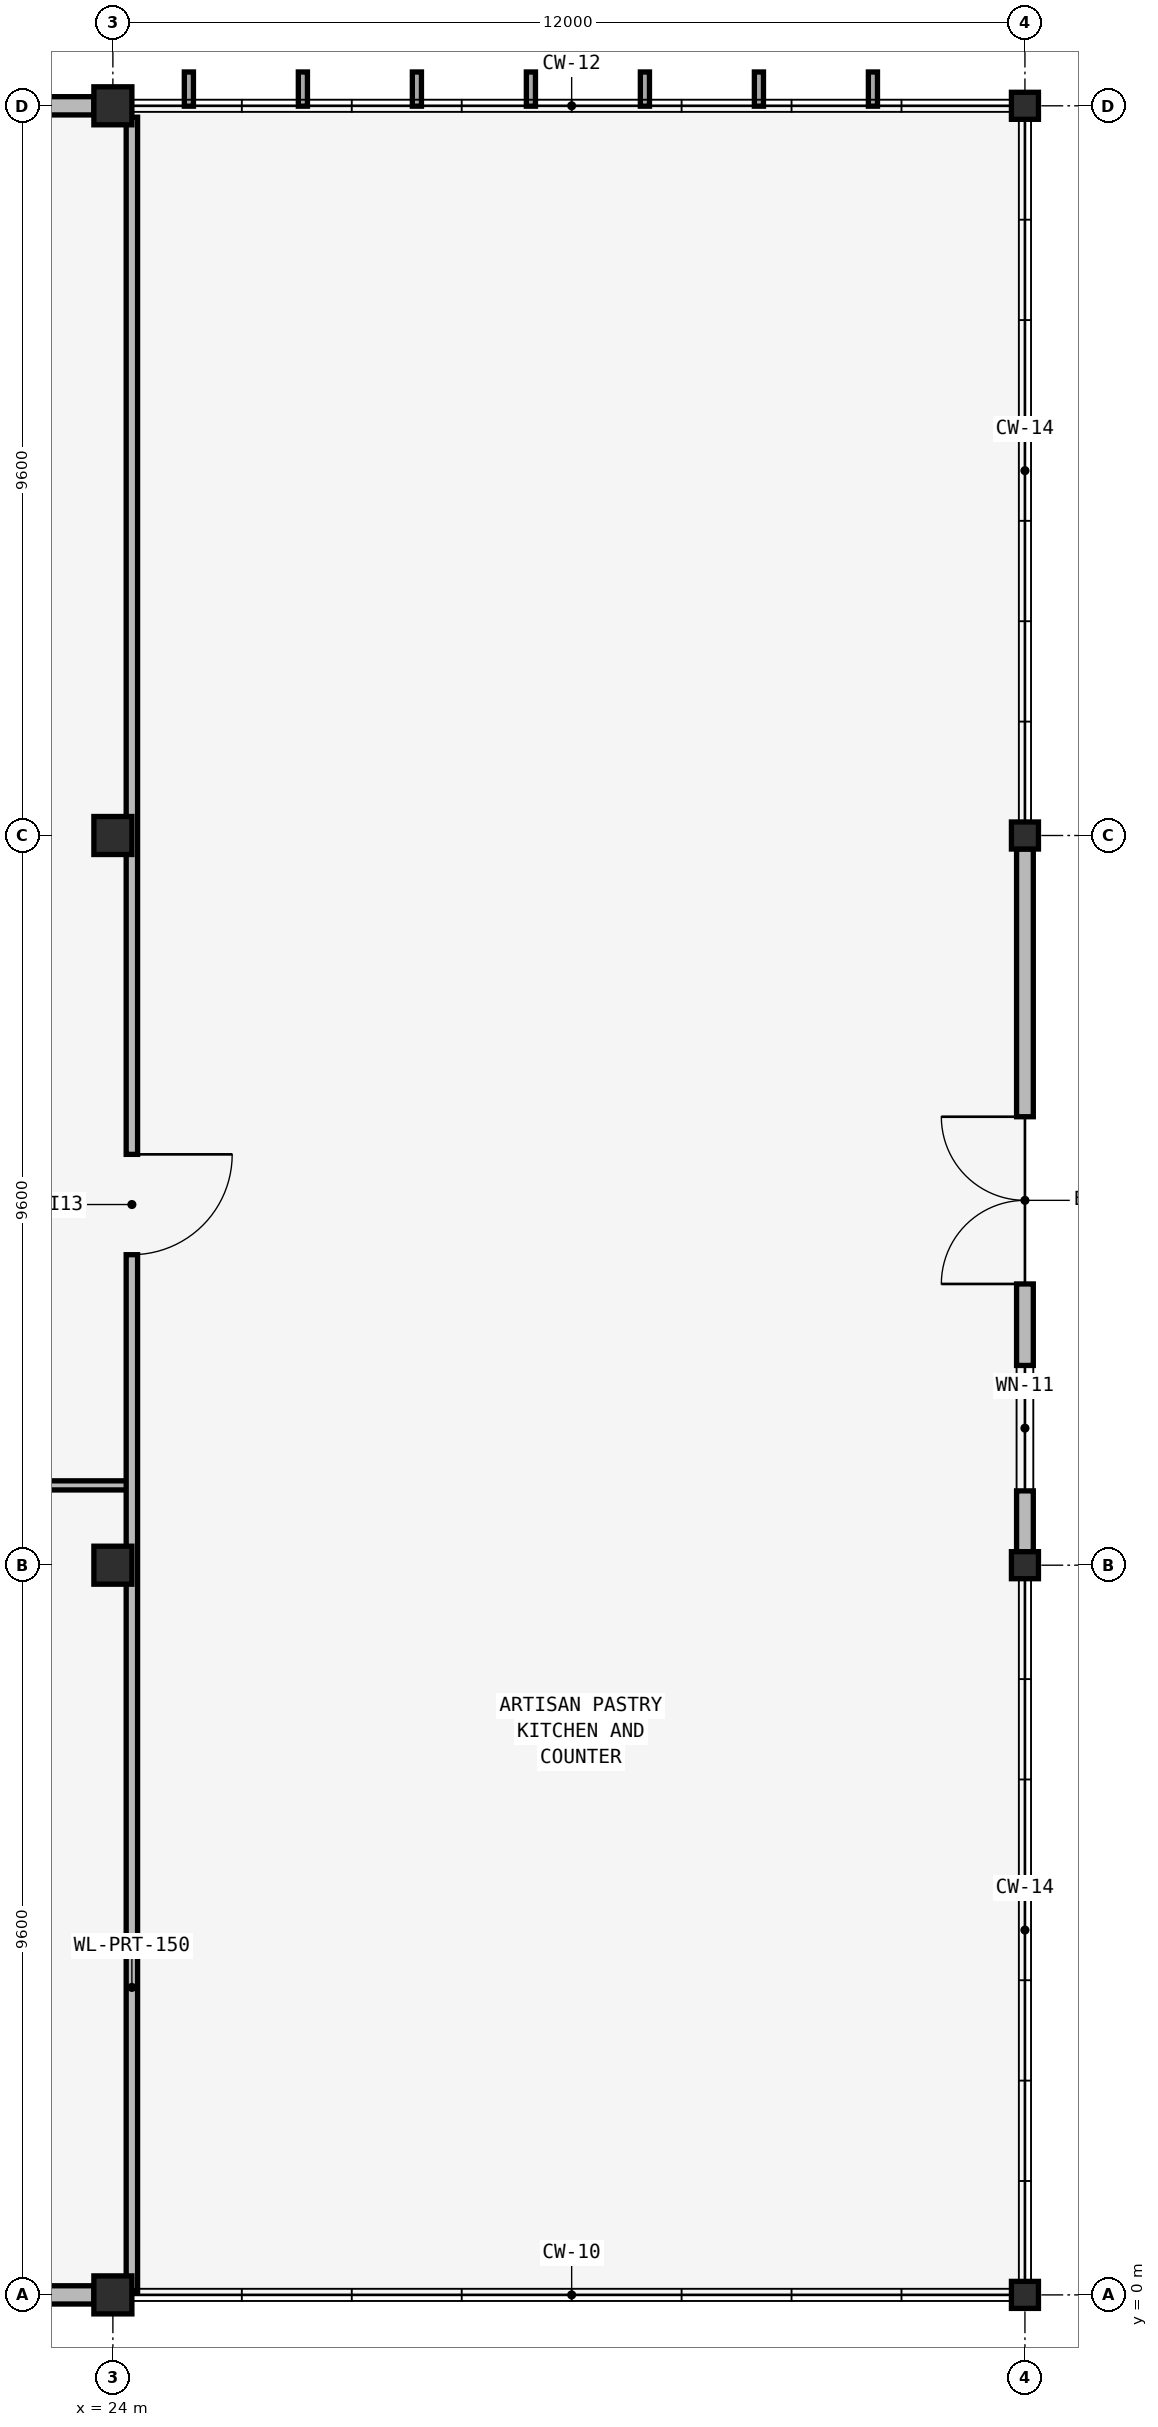
"""IFC4 building model, lengths in metres.
Left out: names, types, materials, properties, quantities, classifications, styles, units other than length and angle.
Written with IfcOpenShell. Run it as: python <this file> out.ifc"""

import sys

from ifc_helpers import new_model, si_unit, direction, frame, frame_2d, origin, origin_2d, place, context, subcontext, project, spatial, rectangle, hollow_circle, extrude, element, fill, save


model = new_model("IFC4")
c1 = context("Model", 3, precision=1e-05, world=origin(), true_north=direction((0.0, 1.0)))
c2 = subcontext(c1, "Body", "Model", "MODEL_VIEW")
j1 = project(units=[si_unit("LENGTHUNIT", "METRE"), si_unit("PLANEANGLEUNIT", "RADIAN")], contexts=[c1])
p1 = place(None, origin())
s1 = spatial("IfcSite", under=j1, at=p1, CompositionType="ELEMENT")
p2 = place(p1, origin())
s2 = spatial("IfcBuilding", under=s1, at=p2, CompositionType="ELEMENT")
p3 = place(p2, origin())
s3 = spatial("IfcBuildingStorey", under=s2, at=p3, CompositionType="ELEMENT", Elevation=0.0)
p4 = place(p3, frame((24.0, 0.0, -0.27), z_axis=(0.0, 0.0, 1.0), x_axis=(1.0, 0.0, 0.0)))
e1 = element("IfcColumn", 1, at=p4, inside=s3, PredefinedType="COLUMN", context=c2, shape_type="SweptSolid", body=[
    extrude(rectangle(XDim=0.5, YDim=0.5, at=origin_2d()), origin(), (0.0, 0.0, 1.0), 5.67),
])
p5 = place(p3, frame((36.0, 0.0, -0.27), z_axis=(0.0, 0.0, 1.0), x_axis=(1.0, 0.0, 0.0)))
e2 = element("IfcColumn", 2, at=p5, inside=s3, PredefinedType="COLUMN", context=c2, shape_type="SweptSolid", body=[
    extrude(hollow_circle(Radius=0.178, WallThickness=0.013, at=origin_2d()), origin(), (0.0, 0.0, 1.0), 5.67),
])
p6 = place(p3, frame((24.0, 9.6, -0.27), z_axis=(0.0, 0.0, 1.0), x_axis=(1.0, 0.0, 0.0)))
e3 = element("IfcColumn", 3, at=p6, inside=s3, PredefinedType="COLUMN", context=c2, shape_type="SweptSolid", body=[
    extrude(rectangle(XDim=0.5, YDim=0.5, at=origin_2d()), origin(), (0.0, 0.0, 1.0), 5.67),
])
p7 = place(p3, frame((36.0, 9.6, -0.27), z_axis=(0.0, 0.0, 1.0), x_axis=(1.0, 0.0, 0.0)))
e4 = element("IfcColumn", 4, at=p7, inside=s3, PredefinedType="COLUMN", context=c2, shape_type="SweptSolid", body=[
    extrude(hollow_circle(Radius=0.178, WallThickness=0.013, at=origin_2d()), origin(), (0.0, 0.0, 1.0), 5.67),
])
p8 = place(p3, frame((24.0, 19.2, -0.27), z_axis=(0.0, 0.0, 1.0), x_axis=(1.0, 0.0, 0.0)))
e5 = element("IfcColumn", 5, at=p8, inside=s3, PredefinedType="COLUMN", context=c2, shape_type="SweptSolid", body=[
    extrude(rectangle(XDim=0.5, YDim=0.5, at=origin_2d()), origin(), (0.0, 0.0, 1.0), 5.67),
])
p9 = place(p3, frame((36.0, 19.2, -0.27), z_axis=(0.0, 0.0, 1.0), x_axis=(1.0, 0.0, 0.0)))
e6 = element("IfcColumn", 6, at=p9, inside=s3, PredefinedType="COLUMN", context=c2, shape_type="SweptSolid", body=[
    extrude(hollow_circle(Radius=0.178, WallThickness=0.013, at=origin_2d()), origin(), (0.0, 0.0, 1.0), 5.67),
])
p10 = place(p3, frame((24.0, 28.8, -0.27), z_axis=(0.0, 0.0, 1.0), x_axis=(1.0, 0.0, 0.0)))
e7 = element("IfcColumn", 7, at=p10, inside=s3, PredefinedType="COLUMN", context=c2, shape_type="SweptSolid", body=[
    extrude(rectangle(XDim=0.5, YDim=0.5, at=origin_2d()), origin(), (0.0, 0.0, 1.0), 5.67),
])
p11 = place(p3, frame((36.0, 28.8, -0.27), z_axis=(0.0, 0.0, 1.0), x_axis=(1.0, 0.0, 0.0)))
e8 = element("IfcColumn", 8, at=p11, inside=s3, PredefinedType="COLUMN", context=c2, shape_type="SweptSolid", body=[
    extrude(hollow_circle(Radius=0.178, WallThickness=0.013, at=origin_2d()), origin(), (0.0, 0.0, 1.0), 5.67),
])
p12 = place(p3, frame((12.25, 0.0, 0.0), z_axis=(0.0, 0.0, 1.0), x_axis=(1.0, 0.0, 0.0)))
e9 = element("IfcWall", 9, at=p12, inside=s3, PredefinedType="SOLIDWALL", context=c2, shape_type="SweptSolid", body=[
    extrude(rectangle(XDim=11.5, YDim=0.24, at=frame_2d((5.75, 0.0))), origin(), (0.0, 0.0, 1.0), 4.456),
])
p13 = place(p12, frame((4.55, 0.0, 0.0)))
e10 = element("IfcOpeningElement", 10, at=p13, cuts=e9, PredefinedType="OPENING", context=c2, shape_type="SweptSolid", body=[
    extrude(rectangle(XDim=2.4, YDim=2.4, at=frame_2d((1.2, 1.2))), frame((0.0, 0.135, 0.0), z_axis=(0.0, -1.0, 0.0), x_axis=(1.0, 0.0, 0.0)), (0.0, 0.0, 1.0), 0.27),
])
p14 = place(p3, frame((12.25, 28.8, 0.0), z_axis=(0.0, 0.0, 1.0), x_axis=(1.0, 0.0, 0.0)))
e11 = element("IfcWall", 11, at=p14, inside=s3, PredefinedType="SOLIDWALL", context=c2, shape_type="SweptSolid", body=[
    extrude(rectangle(XDim=11.5, YDim=0.24, at=frame_2d((5.75, 0.0))), origin(), (0.0, 0.0, 1.0), 4.456),
])
p15 = place(p14, frame((4.75, 0.0, 0.0)))
e12 = element("IfcOpeningElement", 12, at=p15, cuts=e11, PredefinedType="OPENING", context=c2, shape_type="SweptSolid", body=[
    extrude(rectangle(XDim=2.0, YDim=2.3, at=frame_2d((1.0, 1.15))), frame((0.0, 0.135, 0.0), z_axis=(0.0, -1.0, 0.0), x_axis=(1.0, 0.0, 0.0)), (0.0, 0.0, 1.0), 0.27),
])
p16 = place(p3, frame((36.0, 9.778, 0.0), z_axis=(0.0, 0.0, 1.0), x_axis=(0.0, 1.0, 0.0)))
e13 = element("IfcWall", 13, at=p16, inside=s3, PredefinedType="SOLIDWALL", context=c2, shape_type="SweptSolid", body=[
    extrude(rectangle(XDim=9.244, YDim=0.22, at=frame_2d((4.622, 0.0))), origin(), (0.0, 0.0, 1.0), 4.456),
])
p17 = place(p16, frame((3.522, 0.0, 0.0)))
e14 = element("IfcOpeningElement", 14, at=p17, cuts=e13, PredefinedType="OPENING", context=c2, shape_type="SweptSolid", body=[
    extrude(rectangle(XDim=2.2, YDim=2.4, at=frame_2d((1.1, 1.2))), frame((0.0, 0.125, 0.0), z_axis=(0.0, -1.0, 0.0), x_axis=(1.0, 0.0, 0.0)), (0.0, 0.0, 1.0), 0.25),
])
p18 = place(p16, frame((0.8, 0.0, 0.8)))
e15 = element("IfcOpeningElement", 15, at=p18, cuts=e13, PredefinedType="OPENING", context=c2, shape_type="SweptSolid", body=[
    extrude(rectangle(XDim=1.65, YDim=2.1, at=frame_2d((0.825, 1.05))), frame((0.0, 0.125, 0.0), z_axis=(0.0, -1.0, 0.0), x_axis=(1.0, 0.0, 0.0)), (0.0, 0.0, 1.0), 0.25),
])
p19 = place(p3, frame((12.35, 10.65, 0.0), z_axis=(0.0, 0.0, 1.0), x_axis=(1.0, 0.0, 0.0)))
e16 = element("IfcWall", 16, at=p19, inside=s3, PredefinedType="PARTITIONING", context=c2, shape_type="SweptSolid", body=[
    extrude(rectangle(XDim=11.9, YDim=0.12, at=frame_2d((5.95, 0.0))), origin(), (0.0, 0.0, 1.0), 5.08),
])
p20 = place(p19, frame((5.025, 0.0, 0.0)))
e17 = element("IfcOpeningElement", 17, at=p20, cuts=e16, PredefinedType="OPENING", context=c2, shape_type="SweptSolid", body=[
    extrude(rectangle(XDim=1.85, YDim=2.2, at=frame_2d((0.925, 1.1))), frame((0.0, 0.075, 0.0), z_axis=(0.0, -1.0, 0.0), x_axis=(1.0, 0.0, 0.0)), (0.0, 0.0, 1.0), 0.15),
])
p21 = place(p3, frame((24.25, 0.04, 0.0), z_axis=(0.0, 0.0, 1.0), x_axis=(0.0, 1.0, 0.0)))
e18 = element("IfcWall", 18, at=p21, inside=s3, PredefinedType="PARTITIONING", context=c2, shape_type="SweptSolid", body=[
    extrude(rectangle(XDim=28.61, YDim=0.15, at=frame_2d((14.305, 0.0))), origin(), (0.0, 0.0, 1.0), 5.08),
])
p22 = place(p21, frame((13.645, 0.0, 0.0)))
e19 = element("IfcOpeningElement", 19, at=p22, cuts=e18, PredefinedType="OPENING", context=c2, shape_type="SweptSolid", body=[
    extrude(rectangle(XDim=1.32, YDim=2.15, at=frame_2d((0.66, 1.075))), frame((0.0, 0.09, 0.0), z_axis=(0.0, -1.0, 0.0), x_axis=(1.0, 0.0, 0.0)), (0.0, 0.0, 1.0), 0.18),
])
p23 = place(p17, frame((2.2, 0.0, 0.0), z_axis=(0.0, 0.0, 1.0), x_axis=(-1.0, 0.0, 0.0)))
e20 = element("IfcDoor", 20, at=p23, inside=s3, OperationType="DOUBLE_DOOR_SINGLE_SWING", PredefinedType="DOOR", context=c2, shape_type="SweptSolid", body=[
    extrude(rectangle(XDim=2.2, YDim=2.4, at=frame_2d((1.1, 1.2))), frame((0.0, 0.025, 0.0), z_axis=(0.0, -1.0, 0.0), x_axis=(1.0, 0.0, 0.0)), (0.0, 0.0, 1.0), 0.05),
])
fill(e14, e20)
p24 = place(p18, origin())
e21 = element("IfcWindow", 21, at=p24, inside=s3, PartitioningType="SINGLE_PANEL", PredefinedType="WINDOW", context=c2, shape_type="SweptSolid", body=[
    extrude(rectangle(XDim=1.65, YDim=2.1, at=frame_2d((0.825, 1.05))), frame((0.0, 0.03, 0.0), z_axis=(0.0, -1.0, 0.0), x_axis=(1.0, 0.0, 0.0)), (0.0, 0.0, 1.0), 0.06),
])
fill(e15, e21)
p25 = place(p22, origin())
e22 = element("IfcDoor", 22, at=p25, inside=s3, OperationType="SINGLE_SWING_RIGHT", PredefinedType="DOOR", context=c2, shape_type="SweptSolid", body=[
    extrude(rectangle(XDim=1.32, YDim=2.15, at=frame_2d((0.66, 1.075))), frame((0.0, 0.025, 0.0), z_axis=(0.0, -1.0, 0.0), x_axis=(1.0, 0.0, 0.0)), (0.0, 0.0, 1.0), 0.05),
])
fill(e19, e22)
save(model, sys.argv[1])
